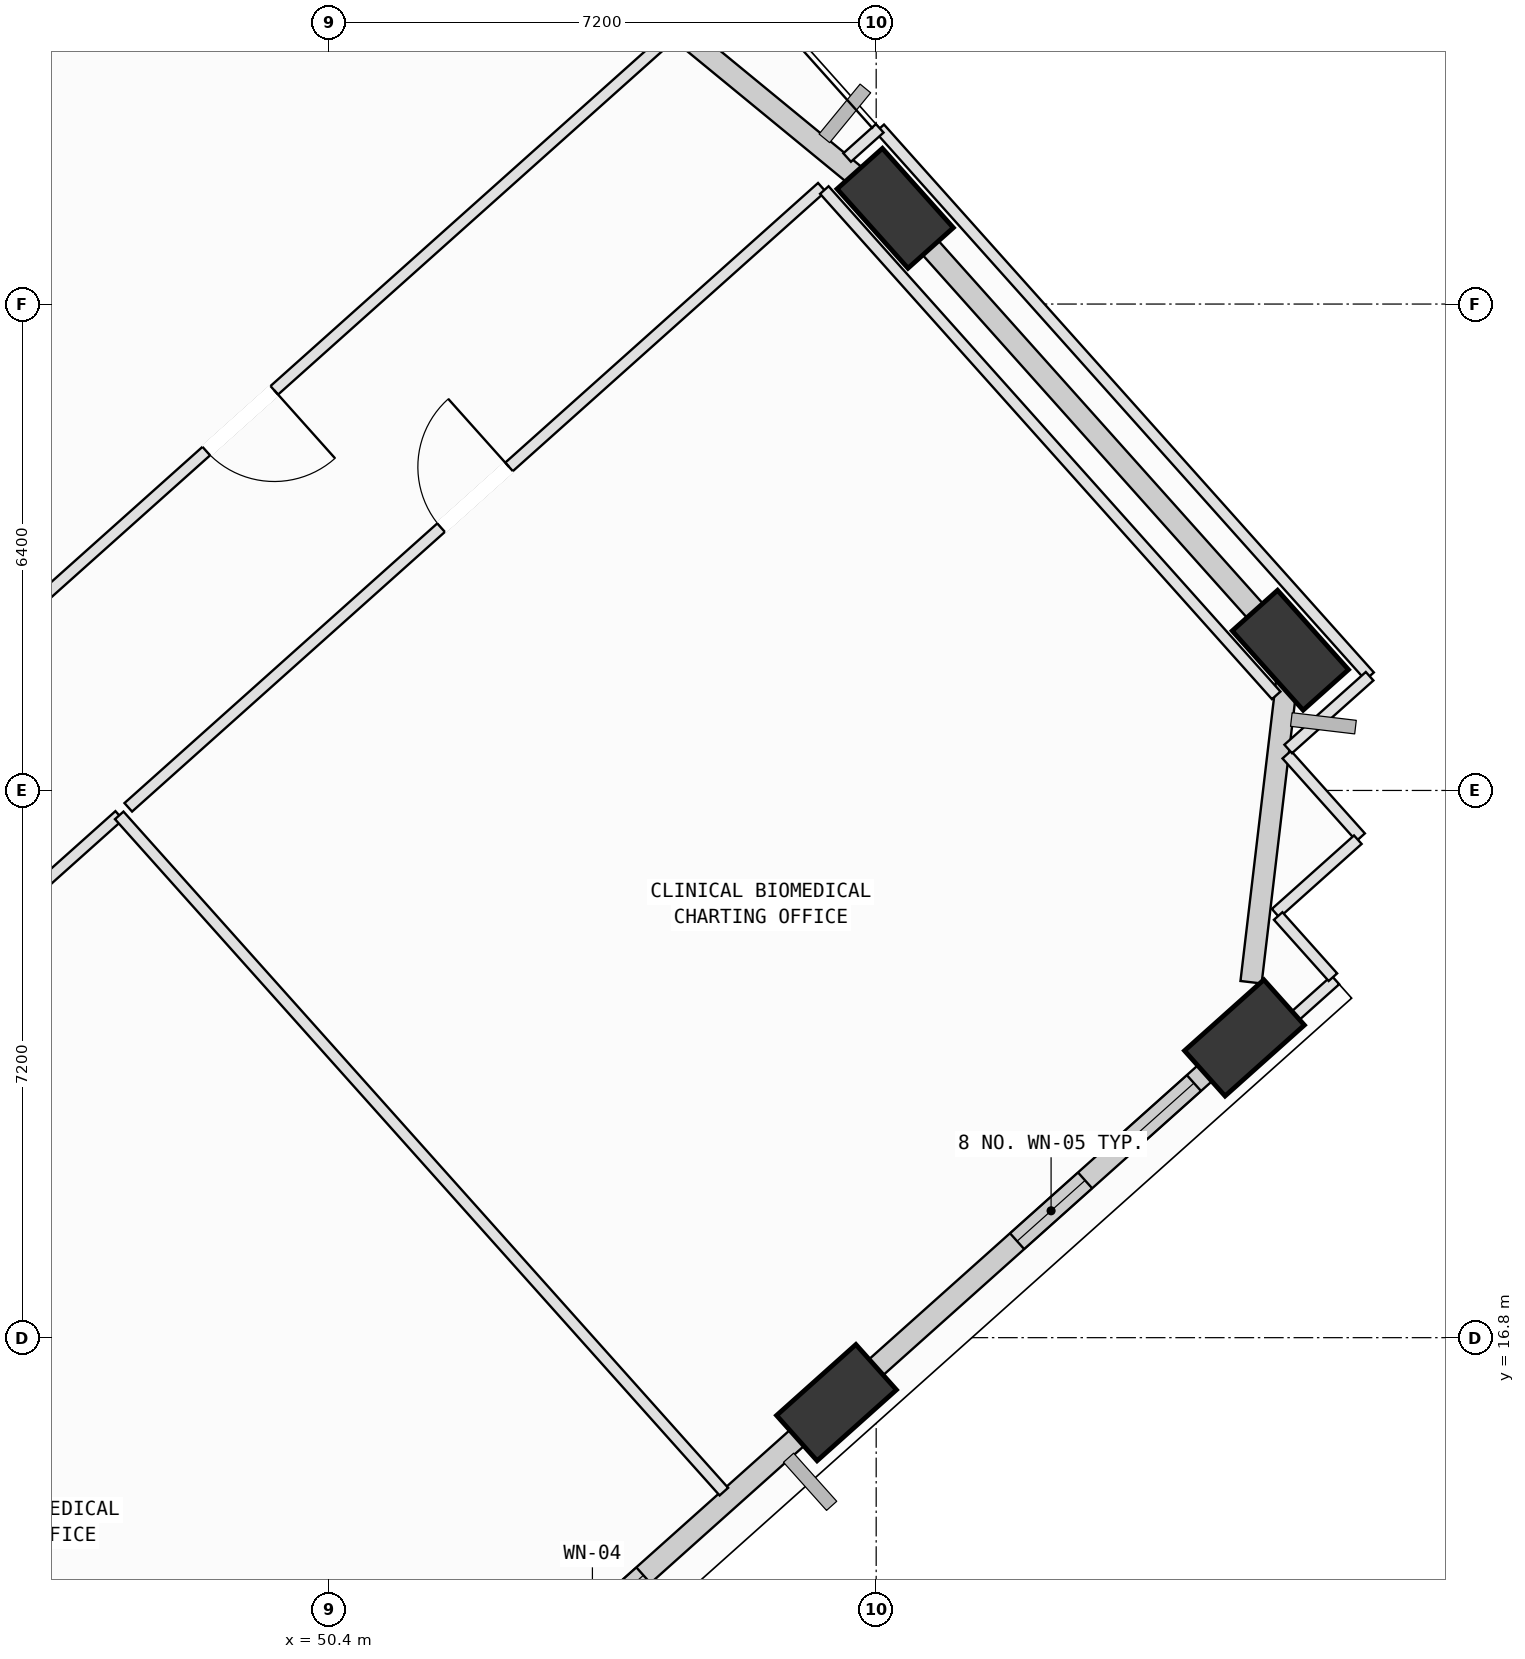
"""IFC4 building model, lengths in metres.
Left out: names, types, materials, properties, quantities, classifications, styles, units other than length and angle.
Written with IfcOpenShell. Run it as: python <this file> out.ifc"""

import sys

from ifc_helpers import new_model, si_unit, direction, frame, frame_2d, origin, origin_2d, place, context, subcontext, project, spatial, rectangle, extrude, element, fill, save


model = new_model("IFC4")
c1 = context("Model", 3, precision=1e-05, world=origin(), true_north=direction((0.0, 1.0)))
c2 = subcontext(c1, "Body", "Model", "MODEL_VIEW")
j1 = project(units=[si_unit("LENGTHUNIT", "METRE"), si_unit("PLANEANGLEUNIT", "RADIAN")], contexts=[c1])
p1 = place(None, origin())
s1 = spatial("IfcSite", under=j1, at=p1, CompositionType="ELEMENT")
p2 = place(p1, origin())
s2 = spatial("IfcBuilding", under=s1, at=p2, CompositionType="ELEMENT")
p3 = place(p2, frame((0.0, 0.0, 201.8)))
s3 = spatial("IfcBuildingStorey", under=s2, at=p3, CompositionType="ELEMENT", Elevation=201.8)
p4 = place(p3, frame((57.078, 15.945, 0.002), z_axis=(0.035710881286, 0.097088958495, 0.994634841083), x_axis=(-0.928505606296, -0.364860270306, 0.068951593376)))
e1 = element("IfcColumn", 1, at=p4, inside=s3, PredefinedType="COLUMN", context=c2, shape_type="SweptSolid", body=[
    extrude(rectangle(XDim=1.4, YDim=0.8, at=origin_2d()), origin(), (0.0, 0.0, 1.0), 3.938),
])
p5 = place(p3, frame((62.445, 20.744, 0.002), z_axis=(0.015707334177, 0.118829397689, 0.992790438057), x_axis=(-0.825762803274, -0.55833051582, 0.07989260187)))
e2 = element("IfcColumn", 2, at=p5, inside=s3, PredefinedType="COLUMN", context=c2, shape_type="SweptSolid", body=[
    extrude(rectangle(XDim=1.4, YDim=0.8, at=origin_2d()), origin(), (0.0, 0.0, 1.0), 3.932),
])
p6 = place(p3, frame((63.049, 25.845, 0.002), z_axis=(-0.005281577236, 0.121103459221, 0.992625839431), x_axis=(0.698140881378, -0.71023473531, 0.090365538281)))
e3 = element("IfcColumn", 3, at=p6, inside=s3, PredefinedType="COLUMN", context=c2, shape_type="SweptSolid", body=[
    extrude(rectangle(XDim=1.4, YDim=0.8, at=origin_2d()), origin(), (0.0, 0.0, 1.0), 3.929),
])
p7 = place(p3, frame((57.85, 31.66, 0.002), z_axis=(-0.029097597923, 0.099701151094, 0.994591881259), x_axis=(0.847563422999, -0.525015754062, 0.077425460805)))
e4 = element("IfcColumn", 4, at=p7, inside=s3, PredefinedType="COLUMN", context=c2, shape_type="SweptSolid", body=[
    extrude(rectangle(XDim=1.4, YDim=0.8, at=origin_2d()), origin(), (0.0, 0.0, 1.0), 3.935),
])
p8 = place(p3, frame((56.852, 15.743, 0.0), z_axis=(0.0, 0.0, 1.0), x_axis=(-0.745463071049, -0.666546929857, 0.0)))
e5 = element("IfcWall", 5, at=p8, inside=s3, PredefinedType="SOLIDWALL", context=c2, shape_type="SweptSolid", body=[
    extrude(rectangle(XDim=6.218, YDim=0.28, at=frame_2d((3.109, 0.0))), origin(), (0.0, 0.0, 1.0), 3.185),
])
p9 = place(p8, frame((3.105, 0.0, 0.75)))
e6 = element("IfcOpeningElement", 6, at=p9, cuts=e5, PredefinedType="OPENING", context=c2, shape_type="SweptSolid", body=[
    extrude(rectangle(XDim=1.8, YDim=2.05, at=frame_2d((0.9, 1.025))), frame((0.0, 0.15, 0.0), z_axis=(0.0, -1.0, 0.0), x_axis=(1.0, 0.0, 0.0)), (0.0, 0.0, 1.0), 0.3),
])
p10 = place(p3, frame((62.231, 20.552, 0.0), z_axis=(0.0, 0.0, 1.0), x_axis=(-0.745466301169, -0.666543317288, 0.0)))
e7 = element("IfcWall", 7, at=p10, inside=s3, PredefinedType="SOLIDWALL", context=c2, shape_type="SweptSolid", body=[
    extrude(rectangle(XDim=6.242, YDim=0.28, at=frame_2d((3.121, 0.0))), origin(), (0.0, 0.0, 1.0), 3.185),
])
p11 = place(p10, frame((2.525, 0.0, 0.75)))
e8 = element("IfcOpeningElement", 8, at=p11, cuts=e7, PredefinedType="OPENING", context=c2, shape_type="SweptSolid", body=[
    extrude(rectangle(XDim=1.2, YDim=1.75, at=frame_2d((0.6, 0.875))), frame((0.0, 0.15, 0.0), z_axis=(0.0, -1.0, 0.0), x_axis=(1.0, 0.0, 0.0)), (0.0, 0.0, 1.0), 0.3),
])
p12 = place(p10, frame((0.604, 0.0, 0.75)))
e9 = element("IfcOpeningElement", 9, at=p12, cuts=e7, PredefinedType="OPENING", context=c2, shape_type="SweptSolid", body=[
    extrude(rectangle(XDim=1.2, YDim=1.75, at=frame_2d((0.6, 0.875))), frame((0.0, 0.15, 0.0), z_axis=(0.0, -1.0, 0.0), x_axis=(1.0, 0.0, 0.0)), (0.0, 0.0, 1.0), 0.3),
])
p13 = place(p3, frame((63.019, 25.593, 0.0), z_axis=(0.0, 0.0, 1.0), x_axis=(-0.117558838406, -0.993065919017, 0.0)))
e10 = element("IfcWall", 10, at=p13, inside=s3, PredefinedType="SOLIDWALL", context=c2, shape_type="SweptSolid", body=[
    extrude(rectangle(XDim=4.145, YDim=0.28, at=frame_2d((2.073, 0.0))), origin(), (0.0, 0.0, 1.0), 3.185),
])
p14 = place(p3, frame((58.05, 31.436, 0.0), z_axis=(0.0, 0.0, 1.0), x_axis=(0.666527724526, -0.745480242822, 0.0)))
e11 = element("IfcWall", 11, at=p14, inside=s3, PredefinedType="SOLIDWALL", context=c2, shape_type="SweptSolid", body=[
    extrude(rectangle(XDim=6.84, YDim=0.28, at=frame_2d((3.42, 0.0))), origin(), (0.0, 0.0, 1.0), 3.185),
])
p15 = place(p3, frame((50.516, 37.686, 0.0), z_axis=(0.0, 0.0, 1.0), x_axis=(0.772625109764, -0.634862536115, 0.0)))
e12 = element("IfcWall", 12, at=p15, inside=s3, PredefinedType="SOLIDWALL", context=c2, shape_type="SweptSolid", body=[
    extrude(rectangle(XDim=8.838, YDim=0.28, at=frame_2d((4.419, 0.0))), origin(), (0.0, 0.0, 1.0), 3.185),
])
p16 = place(p3, frame((38.516, 15.513, 0.0), z_axis=(0.0, 0.0, 1.0), x_axis=(0.745456187518, 0.666554628287, 0.0)))
e13 = element("IfcWall", 13, at=p16, inside=s3, PredefinedType="PARTITIONING", context=c2, shape_type="SweptSolid", body=[
    extrude(rectangle(XDim=12.241, YDim=0.15, at=frame_2d((6.12, 0.0))), origin(), (0.0, 0.0, 1.0), 3.7),
])
p17 = place(p16, frame((5.521, 0.0, 0.0)))
e14 = element("IfcOpeningElement", 14, at=p17, cuts=e13, PredefinedType="OPENING", context=c2, shape_type="SweptSolid", body=[
    extrude(rectangle(XDim=1.2, YDim=2.15, at=frame_2d((0.6, 1.075))), frame((0.0, 0.085, 0.0), z_axis=(0.0, -1.0, 0.0), x_axis=(1.0, 0.0, 0.0)), (0.0, 0.0, 1.0), 0.17),
])
p18 = place(p3, frame((47.641, 23.672, 0.0), z_axis=(0.0, 0.0, 1.0), x_axis=(0.666482690368, -0.745520505043, 0.0)))
e15 = element("IfcWall", 15, at=p18, inside=s3, PredefinedType="PARTITIONING", context=c2, shape_type="SweptSolid", body=[
    extrude(rectangle(XDim=11.936, YDim=0.15, at=frame_2d((5.968, 0.0))), origin(), (0.0, 0.0, 1.0), 3.7),
])
p19 = place(p3, frame((63.642, 21.506, 0.0), z_axis=(0.0, 0.0, 1.0), x_axis=(-0.745426670507, -0.666587637822, 0.0)))
e16 = element("IfcWall", 16, at=p19, inside=s3, PredefinedType="PARTITIONING", context=c2, shape_type="SweptSolid", body=[
    extrude(rectangle(XDim=1.688, YDim=0.15, at=frame_2d((0.844, 0.0))), origin(), (0.0, 0.0, 1.0), 3.7),
])
p20 = place(p3, frame((57.731, 16.22, 0.0), z_axis=(0.0, 0.0, 1.0), x_axis=(-0.746106787817, -0.665826299551, 0.0)))
e17 = element("IfcWall", 17, at=p20, inside=s3, PredefinedType="PARTITIONING", context=c2, shape_type="SweptSolid", body=[
    extrude(rectangle(XDim=0.973, YDim=0.15, at=frame_2d((0.487, 0.0))), origin(), (0.0, 0.0, 1.0), 3.185),
])
p21 = place(p3, frame((47.76, 23.778, 0.0), z_axis=(0.0, 0.0, 1.0), x_axis=(0.745466097876, 0.666543544652, 0.0)))
e18 = element("IfcWall", 18, at=p21, inside=s3, PredefinedType="PARTITIONING", context=c2, shape_type="SweptSolid", body=[
    extrude(rectangle(XDim=12.241, YDim=0.15, at=frame_2d((6.12, 0.0))), origin(), (0.0, 0.0, 1.0), 2.985),
])
p22 = place(p21, frame((5.521, 0.0, 0.0)))
e19 = element("IfcOpeningElement", 19, at=p22, cuts=e18, PredefinedType="OPENING", context=c2, shape_type="SweptSolid", body=[
    extrude(rectangle(XDim=1.2, YDim=2.15, at=frame_2d((0.6, 1.075))), frame((0.0, 0.085, 0.0), z_axis=(0.0, -1.0, 0.0), x_axis=(1.0, 0.0, 0.0)), (0.0, 0.0, 1.0), 0.17),
])
p23 = place(p3, frame((56.918, 31.9, 0.0), z_axis=(0.0, 0.0, 1.0), x_axis=(0.666547585993, -0.745462484372, 0.0)))
e20 = element("IfcWall", 20, at=p23, inside=s3, PredefinedType="PARTITIONING", context=c2, shape_type="SweptSolid", body=[
    extrude(rectangle(XDim=8.919, YDim=0.15, at=frame_2d((4.459, 0.0))), origin(), (0.0, 0.0, 1.0), 3.7),
])
p24 = place(p3, frame((63.002, 24.471, 0.0), z_axis=(0.0, 0.0, 1.0), x_axis=(0.667000477317, -0.745057288575, 0.0)))
e21 = element("IfcWall", 21, at=p24, inside=s3, PredefinedType="PARTITIONING", context=c2, shape_type="SweptSolid", body=[
    extrude(rectangle(XDim=1.458, YDim=0.15, at=frame_2d((0.729, 0.0))), origin(), (0.0, 0.0, 1.0), 3.7),
])
p25 = place(p3, frame((63.937, 23.352, 0.0), z_axis=(0.0, 0.0, 1.0), x_axis=(-0.74531614601, -0.666711213718, 0.0)))
e22 = element("IfcWall", 22, at=p25, inside=s3, PredefinedType="PARTITIONING", context=c2, shape_type="SweptSolid", body=[
    extrude(rectangle(XDim=1.45, YDim=0.15, at=frame_2d((0.725, 0.0))), origin(), (0.0, 0.0, 1.0), 3.7),
])
p26 = place(p3, frame((62.889, 22.348, 0.0), z_axis=(0.0, 0.0, 1.0), x_axis=(0.666675904184, -0.74534773011, 0.0)))
e23 = element("IfcWall", 23, at=p26, inside=s3, PredefinedType="PARTITIONING", context=c2, shape_type="SweptSolid", body=[
    extrude(rectangle(XDim=1.08, YDim=0.15, at=frame_2d((0.54, 0.0))), origin(), (0.0, 0.0, 1.0), 3.7),
])
p27 = place(p3, frame((54.902, 33.933, 0.0), z_axis=(0.0, 0.0, 1.0), x_axis=(-0.745495701488, -0.666510434324, 0.0)))
e24 = element("IfcWall", 24, at=p27, inside=s3, PredefinedType="PARTITIONING", context=c2, shape_type="SweptSolid", body=[
    extrude(rectangle(XDim=15.208, YDim=0.15, at=frame_2d((7.604, 0.0))), origin(), (0.0, 0.0, 1.0), 3.7),
])
p28 = place(p27, frame((7.004, 0.0, 0.0)))
e25 = element("IfcOpeningElement", 25, at=p28, cuts=e24, PredefinedType="OPENING", context=c2, shape_type="SweptSolid", body=[
    extrude(rectangle(XDim=1.2, YDim=2.15, at=frame_2d((0.6, 1.075))), frame((0.0, 0.085, 0.0), z_axis=(0.0, -1.0, 0.0), x_axis=(1.0, 0.0, 0.0)), (0.0, 0.0, 1.0), 0.17),
])
p29 = place(p3, frame((39.173, 28.709, 0.0), z_axis=(0.0, 0.0, 1.0), x_axis=(0.745462238393, 0.666547861095, 0.0)))
e26 = element("IfcWall", 26, at=p29, inside=s3, PredefinedType="PARTITIONING", context=c2, shape_type="SweptSolid", body=[
    extrude(rectangle(XDim=14.94, YDim=0.15, at=frame_2d((7.47, 0.0))), origin(), (0.0, 0.0, 1.0), 2.985),
])
p30 = place(p3, frame((57.647, 32.712, 0.0), z_axis=(0.0, 0.0, 1.0), x_axis=(0.666503299324, -0.745502080474, 0.0)))
e27 = element("IfcWall", 27, at=p30, inside=s3, PredefinedType="PARTITIONING", context=c2, shape_type="SweptSolid", body=[
    extrude(rectangle(XDim=9.67, YDim=0.15, at=frame_2d((4.835, 0.0))), origin(), (0.0, 0.0, 1.0), 3.185),
])
p31 = place(p3, frame((64.092, 25.503, 0.0), z_axis=(0.0, 0.0, 1.0), x_axis=(-0.745681256246, -0.666302832114, 0.0)))
e28 = element("IfcWall", 28, at=p31, inside=s3, PredefinedType="PARTITIONING", context=c2, shape_type="SweptSolid", body=[
    extrude(rectangle(XDim=1.436, YDim=0.15, at=frame_2d((0.718, 0.0))), origin(), (0.0, 0.0, 1.0), 3.7),
])
p32 = place(p3, frame((57.218, 32.328, 0.0), z_axis=(0.0, 0.0, 1.0), x_axis=(0.745041654239, 0.667017940875, 0.0)))
e29 = element("IfcWall", 29, at=p32, inside=s3, PredefinedType="PARTITIONING", context=c2, shape_type="SweptSolid", body=[
    extrude(rectangle(XDim=0.576, YDim=0.15, at=frame_2d((0.288, 0.0))), origin(), (0.0, 0.0, 1.0), 3.7),
])
p33 = place(p9, origin())
e30 = element("IfcWindow", 30, at=p33, inside=s3, PartitioningType="SINGLE_PANEL", PredefinedType="WINDOW", context=c2, shape_type="SweptSolid", body=[
    extrude(rectangle(XDim=1.8, YDim=2.05, at=frame_2d((0.9, 1.025))), frame((0.0, 0.03, 0.0), z_axis=(0.0, -1.0, 0.0), x_axis=(1.0, 0.0, 0.0)), (0.0, 0.0, 1.0), 0.06),
])
fill(e6, e30)
p34 = place(p11, origin())
e31 = element("IfcWindow", 31, at=p34, inside=s3, PartitioningType="SINGLE_PANEL", PredefinedType="WINDOW", context=c2, shape_type="SweptSolid", body=[
    extrude(rectangle(XDim=1.2, YDim=1.75, at=frame_2d((0.6, 0.875))), frame((0.0, 0.03, 0.0), z_axis=(0.0, -1.0, 0.0), x_axis=(1.0, 0.0, 0.0)), (0.0, 0.0, 1.0), 0.06),
])
fill(e8, e31)
p35 = place(p12, origin())
e32 = element("IfcWindow", 32, at=p35, inside=s3, PartitioningType="SINGLE_PANEL", PredefinedType="WINDOW", context=c2, shape_type="SweptSolid", body=[
    extrude(rectangle(XDim=1.2, YDim=1.75, at=frame_2d((0.6, 0.875))), frame((0.0, 0.03, 0.0), z_axis=(0.0, -1.0, 0.0), x_axis=(1.0, 0.0, 0.0)), (0.0, 0.0, 1.0), 0.06),
])
fill(e9, e32)
p36 = place(p22, origin())
e33 = element("IfcDoor", 33, at=p36, inside=s3, OperationType="SINGLE_SWING_RIGHT", PredefinedType="DOOR", context=c2, shape_type="SweptSolid", body=[
    extrude(rectangle(XDim=1.2, YDim=2.15, at=frame_2d((0.6, 1.075))), frame((0.0, 0.025, 0.0), z_axis=(0.0, -1.0, 0.0), x_axis=(1.0, 0.0, 0.0)), (0.0, 0.0, 1.0), 0.05),
])
fill(e19, e33)
p37 = place(p28, origin())
e34 = element("IfcDoor", 34, at=p37, inside=s3, OperationType="SINGLE_SWING_LEFT", PredefinedType="DOOR", context=c2, shape_type="SweptSolid", body=[
    extrude(rectangle(XDim=1.2, YDim=2.15, at=frame_2d((0.6, 1.075))), frame((0.0, 0.025, 0.0), z_axis=(0.0, -1.0, 0.0), x_axis=(1.0, 0.0, 0.0)), (0.0, 0.0, 1.0), 0.05),
])
fill(e25, e34)
save(model, sys.argv[1])
